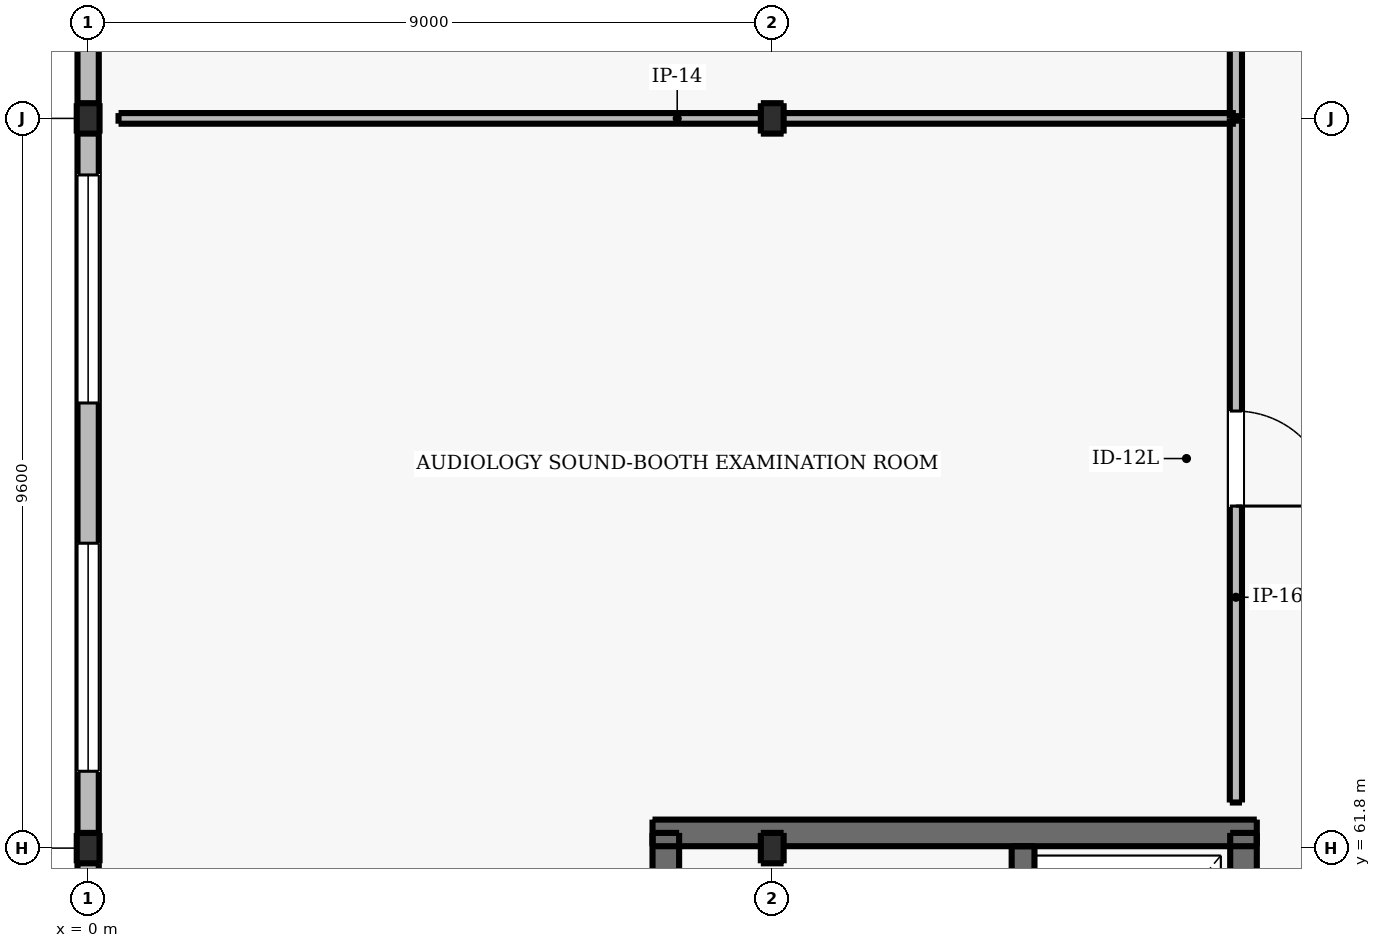
"""IFC4 building model, lengths in metres.
Left out: names, types, materials, properties, quantities, classifications, styles, units other than length and angle.
Written with IfcOpenShell. Run it as: python <this file> out.ifc"""

import sys

from ifc_helpers import new_model, si_unit, direction, frame, frame_2d, origin, origin_2d, place, context, subcontext, project, spatial, rectangle, i_section, extrude, element, fill, save


model = new_model("IFC4")
c1 = context("Model", 3, precision=1e-05, world=origin(), true_north=direction((0.0, 1.0)))
c2 = subcontext(c1, "Body", "Model", "MODEL_VIEW")
j1 = project(units=[si_unit("LENGTHUNIT", "METRE"), si_unit("PLANEANGLEUNIT", "RADIAN")], contexts=[c1])
p1 = place(None, origin())
s1 = spatial("IfcSite", under=j1, at=p1, CompositionType="ELEMENT")
p2 = place(p1, origin())
s2 = spatial("IfcBuilding", under=s1, at=p2, CompositionType="ELEMENT")
p3 = place(p2, frame((0.0, 0.0, 9.6)))
s3 = spatial("IfcBuildingStorey", under=s2, at=p3, CompositionType="ELEMENT", Elevation=9.6)
for number, where, z_axis, x_axis in (
    (1, (0.0, 61.8, 0.0), (0.0, 0.0, 1.0), (1.0, 0.0, 0.0)),
    (2, (0.0, 71.4, 0.0), (0.0, 0.0, 1.0), (1.0, 0.0, 0.0)),
    (3, (9.0, 61.8, 0.0), (0.0, 0.0, 1.0), (1.0, 0.0, 0.0)),
    (4, (9.0, 71.4, 0.0), (0.0, 0.0, 1.0), (1.0, 0.0, 0.0)),
):
    element("IfcColumn", number, at=place(p3, frame(where, z_axis=z_axis, x_axis=x_axis)), inside=s3, PredefinedType="COLUMN", context=c2, shape_type="SweptSolid", body=[
        extrude(i_section(OverallWidth=0.3, OverallDepth=0.4, WebThickness=0.013, FlangeThickness=0.024, FilletRadius=0.027, at=origin_2d()), origin(), (0.0, 0.0, 1.0), 4.2),
    ])
p4 = place(p3, frame((7.425, 62.0, 0.0), z_axis=(0.0, 0.0, 1.0), x_axis=(1.0, 0.0, 0.0)))
e5 = element("IfcWall", 5, at=p4, inside=s3, PredefinedType="SHEAR", context=c2, shape_type="SweptSolid", body=[
    extrude(rectangle(XDim=7.95, YDim=0.35, at=frame_2d((3.975, 0.0))), origin(), (0.0, 0.0, 1.0), 4.2),
])
for number, where, z_axis, x_axis in (
    (6, (7.6, 54.8, 0.0), (0.0, 0.0, 1.0), (0.0, 1.0, 0.0)),
    (7, (15.2, 54.8, 0.0), (0.0, 0.0, 1.0), (0.0, 1.0, 0.0)),
):
    element("IfcWall", number, at=place(p3, frame(where, z_axis=z_axis, x_axis=x_axis)), inside=s3, PredefinedType="SHEAR", context=c2, shape_type="SweptSolid", body=[
        extrude(rectangle(XDim=7.2, YDim=0.35, at=frame_2d((3.6, 0.0))), origin(), (0.0, 0.0, 1.0), 4.2),
    ])
p5 = place(p3, frame((12.3, 58.5, 0.0), z_axis=(0.0, 0.0, 1.0), x_axis=(0.0, 1.0, 0.0)))
e8 = element("IfcWall", 8, at=p5, inside=s3, PredefinedType="SHEAR", context=c2, shape_type="SweptSolid", body=[
    extrude(rectangle(XDim=3.325, YDim=0.3, at=frame_2d((1.663, 0.0))), origin(), (0.0, 0.0, 1.0), 4.2),
])
p6 = place(p5, frame((1.113, 0.0, 0.0)))
e9 = element("IfcOpeningElement", 9, at=p6, cuts=e8, PredefinedType="OPENING", context=c2, shape_type="SweptSolid", body=[
    extrude(rectangle(XDim=1.1, YDim=2.15, at=frame_2d((0.55, 1.075))), frame((0.0, 0.16, 0.0), z_axis=(0.0, -1.0, 0.0), x_axis=(1.0, 0.0, 0.0)), (0.0, 0.0, 1.0), 0.32),
])
p7 = place(p3, frame((0.0, 52.2, 0.0), z_axis=(0.0, 0.0, 1.0), x_axis=(0.0, 1.0, 0.0)))
e10 = element("IfcWall", 10, at=p7, inside=s3, PredefinedType="SOLIDWALL", context=c2, shape_type="SweptSolid", body=[
    extrude(rectangle(XDim=43.6, YDim=0.28, at=frame_2d((21.8, 0.0))), origin(), (0.0, 0.0, 1.0), 3.53),
])
p8 = place(p7, frame((0.922, 0.0, 0.95)))
e11 = element("IfcOpeningElement", 11, at=p8, cuts=e10, PredefinedType="OPENING", context=c2, shape_type="SweptSolid", body=[
    extrude(rectangle(XDim=3.0, YDim=1.8, at=frame_2d((1.5, 0.9))), frame((0.0, 0.15, 0.0), z_axis=(0.0, -1.0, 0.0), x_axis=(1.0, 0.0, 0.0)), (0.0, 0.0, 1.0), 0.3),
])
p9 = place(p7, frame((5.767, 0.0, 0.95)))
e12 = element("IfcOpeningElement", 12, at=p9, cuts=e10, PredefinedType="OPENING", context=c2, shape_type="SweptSolid", body=[
    extrude(rectangle(XDim=3.0, YDim=1.8, at=frame_2d((1.5, 0.9))), frame((0.0, 0.15, 0.0), z_axis=(0.0, -1.0, 0.0), x_axis=(1.0, 0.0, 0.0)), (0.0, 0.0, 1.0), 0.3),
])
p10 = place(p7, frame((10.611, 0.0, 0.95)))
e13 = element("IfcOpeningElement", 13, at=p10, cuts=e10, PredefinedType="OPENING", context=c2, shape_type="SweptSolid", body=[
    extrude(rectangle(XDim=3.0, YDim=1.8, at=frame_2d((1.5, 0.9))), frame((0.0, 0.15, 0.0), z_axis=(0.0, -1.0, 0.0), x_axis=(1.0, 0.0, 0.0)), (0.0, 0.0, 1.0), 0.3),
])
p11 = place(p7, frame((15.456, 0.0, 0.95)))
e14 = element("IfcOpeningElement", 14, at=p11, cuts=e10, PredefinedType="OPENING", context=c2, shape_type="SweptSolid", body=[
    extrude(rectangle(XDim=3.0, YDim=1.8, at=frame_2d((1.5, 0.9))), frame((0.0, 0.15, 0.0), z_axis=(0.0, -1.0, 0.0), x_axis=(1.0, 0.0, 0.0)), (0.0, 0.0, 1.0), 0.3),
])
p12 = place(p7, frame((20.3, 0.0, 0.95)))
e15 = element("IfcOpeningElement", 15, at=p12, cuts=e10, PredefinedType="OPENING", context=c2, shape_type="SweptSolid", body=[
    extrude(rectangle(XDim=3.0, YDim=1.8, at=frame_2d((1.5, 0.9))), frame((0.0, 0.15, 0.0), z_axis=(0.0, -1.0, 0.0), x_axis=(1.0, 0.0, 0.0)), (0.0, 0.0, 1.0), 0.3),
])
p13 = place(p7, frame((25.144, 0.0, 0.95)))
e16 = element("IfcOpeningElement", 16, at=p13, cuts=e10, PredefinedType="OPENING", context=c2, shape_type="SweptSolid", body=[
    extrude(rectangle(XDim=3.0, YDim=1.8, at=frame_2d((1.5, 0.9))), frame((0.0, 0.15, 0.0), z_axis=(0.0, -1.0, 0.0), x_axis=(1.0, 0.0, 0.0)), (0.0, 0.0, 1.0), 0.3),
])
p14 = place(p7, frame((29.989, 0.0, 0.95)))
e17 = element("IfcOpeningElement", 17, at=p14, cuts=e10, PredefinedType="OPENING", context=c2, shape_type="SweptSolid", body=[
    extrude(rectangle(XDim=3.0, YDim=1.8, at=frame_2d((1.5, 0.9))), frame((0.0, 0.15, 0.0), z_axis=(0.0, -1.0, 0.0), x_axis=(1.0, 0.0, 0.0)), (0.0, 0.0, 1.0), 0.3),
])
p15 = place(p7, frame((39.678, 0.0, 0.95)))
e18 = element("IfcOpeningElement", 18, at=p15, cuts=e10, PredefinedType="OPENING", context=c2, shape_type="SweptSolid", body=[
    extrude(rectangle(XDim=3.0, YDim=1.8, at=frame_2d((1.5, 0.9))), frame((0.0, 0.15, 0.0), z_axis=(0.0, -1.0, 0.0), x_axis=(1.0, 0.0, 0.0)), (0.0, 0.0, 1.0), 0.3),
])
p16 = place(p3, frame((15.1, 62.4, 0.0), z_axis=(0.0, 0.0, 1.0), x_axis=(0.0, 1.0, 0.0)))
e19 = element("IfcWall", 19, at=p16, inside=s3, PredefinedType="PARTITIONING", context=c2, shape_type="SweptSolid", body=[
    extrude(rectangle(XDim=9.0, YDim=0.16, at=frame_2d((4.5, 0.0))), origin(), (0.0, 0.0, 1.0), 3.48),
])
p17 = place(p16, frame((3.9, 0.0, 0.0)))
e20 = element("IfcOpeningElement", 20, at=p17, cuts=e19, PredefinedType="OPENING", context=c2, shape_type="SweptSolid", body=[
    extrude(rectangle(XDim=1.25, YDim=2.2, at=frame_2d((0.625, 1.1))), frame((0.0, 0.09, 0.0), z_axis=(0.0, -1.0, 0.0), x_axis=(1.0, 0.0, 0.0)), (0.0, 0.0, 1.0), 0.18),
])
p18 = place(p3, frame((0.4, 71.4, 0.0), z_axis=(0.0, 0.0, 1.0), x_axis=(1.0, 0.0, 0.0)))
e21 = element("IfcWall", 21, at=p18, inside=s3, PredefinedType="PARTITIONING", context=c2, shape_type="SweptSolid", body=[
    extrude(rectangle(XDim=14.7, YDim=0.14, at=frame_2d((7.35, 0.0))), origin(), (0.0, 0.0, 1.0), 3.48),
])
p19 = place(p3, frame((15.1, 71.4, 0.0), z_axis=(0.0, 0.0, 1.0), x_axis=(0.0, 1.0, 0.0)))
e22 = element("IfcWall", 22, at=p19, inside=s3, PredefinedType="PARTITIONING", context=c2, shape_type="SweptSolid", body=[
    extrude(rectangle(XDim=9.5, YDim=0.16, at=frame_2d((4.75, 0.0))), origin(), (0.0, 0.0, 1.0), 3.53),
])
p20 = place(p19, frame((4.15, 0.0, 0.0)))
e23 = element("IfcOpeningElement", 23, at=p20, cuts=e22, PredefinedType="OPENING", context=c2, shape_type="SweptSolid", body=[
    extrude(rectangle(XDim=1.2, YDim=2.2, at=frame_2d((0.6, 1.1))), frame((0.0, 0.09, 0.0), z_axis=(0.0, -1.0, 0.0), x_axis=(1.0, 0.0, 0.0)), (0.0, 0.0, 1.0), 0.18),
])
p21 = place(p10, origin())
e24 = element("IfcWindow", 24, at=p21, inside=s3, PartitioningType="SINGLE_PANEL", PredefinedType="WINDOW", context=c2, shape_type="SweptSolid", body=[
    extrude(rectangle(XDim=3.0, YDim=1.8, at=frame_2d((1.5, 0.9))), frame((0.0, 0.03, 0.0), z_axis=(0.0, -1.0, 0.0), x_axis=(1.0, 0.0, 0.0)), (0.0, 0.0, 1.0), 0.06),
])
fill(e13, e24)
p22 = place(p11, origin())
e25 = element("IfcWindow", 25, at=p22, inside=s3, PartitioningType="SINGLE_PANEL", PredefinedType="WINDOW", context=c2, shape_type="SweptSolid", body=[
    extrude(rectangle(XDim=3.0, YDim=1.8, at=frame_2d((1.5, 0.9))), frame((0.0, 0.03, 0.0), z_axis=(0.0, -1.0, 0.0), x_axis=(1.0, 0.0, 0.0)), (0.0, 0.0, 1.0), 0.06),
])
fill(e14, e25)
p23 = place(p17, frame((1.25, 0.0, 0.0), z_axis=(0.0, 0.0, 1.0), x_axis=(-1.0, 0.0, 0.0)))
e26 = element("IfcDoor", 26, at=p23, inside=s3, OperationType="SINGLE_SWING_LEFT", PredefinedType="DOOR", context=c2, shape_type="SweptSolid", body=[
    extrude(rectangle(XDim=1.25, YDim=2.2, at=frame_2d((0.625, 1.1))), frame((0.0, 0.025, 0.0), z_axis=(0.0, -1.0, 0.0), x_axis=(1.0, 0.0, 0.0)), (0.0, 0.0, 1.0), 0.05),
])
fill(e20, e26)
save(model, sys.argv[1])
